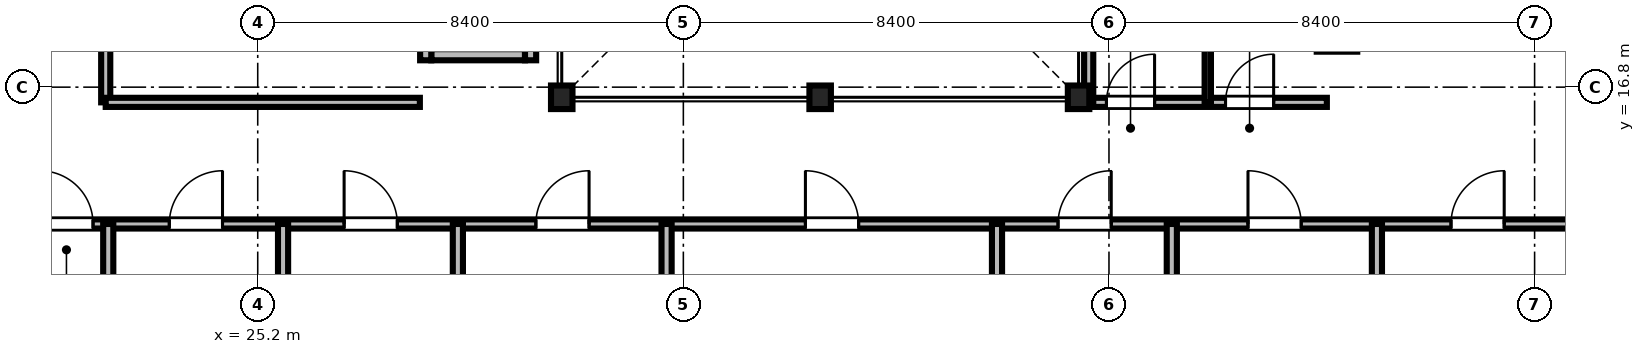
"""IFC4 building model, lengths in metres.
Left out: names, types, materials, properties, quantities, classifications, styles, units other than length and angle.
Written with IfcOpenShell. Run it as: python <this file> out.ifc"""

import sys

from ifc_helpers import new_model, si_unit, direction, frame, frame_2d, origin, origin_2d, place, context, subcontext, project, spatial, rectangle, i_section, extrude, source, transform, mapped, element, fill, save


model = new_model("IFC4")
c1 = context("Model", 3, precision=1e-05, world=origin(), true_north=direction((0.0, 1.0)))
c2 = subcontext(c1, "Body", "Model", "MODEL_VIEW")
j1 = project(units=[si_unit("LENGTHUNIT", "METRE"), si_unit("PLANEANGLEUNIT", "RADIAN")], contexts=[c1])
p1 = place(None, origin())
s1 = spatial("IfcSite", under=j1, at=p1, CompositionType="ELEMENT")
p2 = place(p1, origin())
s2 = spatial("IfcBuilding", under=s1, at=p2, CompositionType="ELEMENT")
p3 = place(p2, frame((0.0, 0.0, 122.4)))
s3 = spatial("IfcBuildingStorey", under=s2, at=p3, CompositionType="ELEMENT", Elevation=122.4)
m1 = source(origin(), c2, "Body", "SweptSolid", [
    extrude(i_section(OverallWidth=0.424, OverallDepth=0.465, WebThickness=0.035, FlangeThickness=0.056, FilletRadius=0.015, at=origin_2d()), origin(), (0.0, 0.0, 1.0), 3.46),
])
for number, where, z_axis, x_axis in (
    (1, (31.2, 16.6, 0.0), (0.0, 0.0, 1.0), (1.0, 0.0, 0.0)),
    (2, (36.3, 16.6, 0.0), (0.0, 0.0, 1.0), (1.0, 0.0, 0.0)),
    (3, (41.4, 16.6, 0.0), (0.0, 0.0, 1.0), (1.0, 0.0, 0.0)),
):
    element("IfcColumn", number, at=place(p3, frame(where, z_axis=z_axis, x_axis=x_axis)), inside=s3, PredefinedType="COLUMN", context=c2, shape_type="MappedRepresentation", body=[
        mapped(m1, transform((0.0, 0.0, 0.0), scale=1.0)),
    ])
m2 = source(origin(), c2, "Body", "SweptSolid", [
    extrude(rectangle(XDim=1.85, YDim=0.22, at=frame_2d((0.925, 0.0))), origin(), (0.0, 0.0, 1.0), 3.46),
])
p4 = place(p3, frame((28.625, 17.44, 0.0), z_axis=(0.0, 0.0, 1.0), x_axis=(1.0, 0.0, 0.0)))
e4 = element("IfcWall", 4, at=p4, inside=s3, PredefinedType="SOLIDWALL", context=c2, shape_type="MappedRepresentation", body=[
    mapped(m2, transform((0.0, 0.0, 0.0), scale=1.0)),
])
m3 = source(origin(), c2, "Body", "SweptSolid", [
    extrude(rectangle(XDim=2.54, YDim=0.22, at=frame_2d((1.27, 0.0))), origin(), (0.0, 0.0, 1.0), 3.46),
])
for number, where, z_axis, x_axis in (
    (5, (28.515, 17.33, 0.0), (0.0, 0.0, 1.0), (0.0, 1.0, 0.0)),
    (6, (30.585, 17.33, 0.0), (0.0, 0.0, 1.0), (0.0, 1.0, 0.0)),
):
    element("IfcWall", number, at=place(p3, frame(where, z_axis=z_axis, x_axis=x_axis)), inside=s3, PredefinedType="SOLIDWALL", context=c2, shape_type="MappedRepresentation", body=[
        mapped(m3, transform((0.0, 0.0, 0.0), scale=1.0)),
    ])
m4 = source(origin(), c2, "Body", "SweptSolid", [
    extrude(rectangle(XDim=46.156, YDim=0.18, at=frame_2d((23.078, 0.0))), origin(), (0.0, 0.0, 1.0), 2.702),
])
p5 = place(p3, frame((6.922, 14.1, 0.0), z_axis=(0.0, 0.0, 1.0), x_axis=(1.0, 0.0, 0.0)))
e7 = element("IfcWall", 7, at=p5, inside=s3, PredefinedType="PARTITIONING", context=c2, shape_type="MappedRepresentation", body=[
    mapped(m4, transform((0.0, 0.0, 0.0), scale=1.0)),
])
m5 = source(origin(), c2, "Body", "SweptSolid", [
    extrude(rectangle(XDim=1.05, YDim=2.2, at=frame_2d((0.525, 1.1))), frame((0.0, 0.1, 0.0), z_axis=(0.0, -1.0, 0.0), x_axis=(1.0, 0.0, 0.0)), (0.0, 0.0, 1.0), 0.2),
])
p6 = place(p5, frame((13.978, 0.0, 0.0)))
e8 = element("IfcOpeningElement", 8, at=p6, cuts=e7, PredefinedType="OPENING", context=c2, shape_type="MappedRepresentation", body=[
    mapped(m5, transform((0.0, 0.0, 0.0), scale=1.0)),
])
p7 = place(p5, frame((16.533, 0.0, 0.0)))
e9 = element("IfcOpeningElement", 9, at=p7, cuts=e7, PredefinedType="OPENING", context=c2, shape_type="MappedRepresentation", body=[
    mapped(m5, transform((0.0, 0.0, 0.0), scale=1.0)),
])
p8 = place(p5, frame((19.983, 0.0, 0.0)))
e10 = element("IfcOpeningElement", 10, at=p8, cuts=e7, PredefinedType="OPENING", context=c2, shape_type="MappedRepresentation", body=[
    mapped(m5, transform((0.0, 0.0, 0.0), scale=1.0)),
])
p9 = place(p5, frame((23.767, 0.0, 0.0)))
e11 = element("IfcOpeningElement", 11, at=p9, cuts=e7, PredefinedType="OPENING", context=c2, shape_type="MappedRepresentation", body=[
    mapped(m5, transform((0.0, 0.0, 0.0), scale=1.0)),
])
p10 = place(p5, frame((29.087, 0.0, 0.0)))
e12 = element("IfcOpeningElement", 12, at=p10, cuts=e7, PredefinedType="OPENING", context=c2, shape_type="MappedRepresentation", body=[
    mapped(m5, transform((0.0, 0.0, 0.0), scale=1.0)),
])
p11 = place(p5, frame((34.073, 0.0, 0.0)))
e13 = element("IfcOpeningElement", 13, at=p11, cuts=e7, PredefinedType="OPENING", context=c2, shape_type="MappedRepresentation", body=[
    mapped(m5, transform((0.0, 0.0, 0.0), scale=1.0)),
])
p12 = place(p5, frame((37.822, 0.0, 0.0)))
e14 = element("IfcOpeningElement", 14, at=p12, cuts=e7, PredefinedType="OPENING", context=c2, shape_type="MappedRepresentation", body=[
    mapped(m5, transform((0.0, 0.0, 0.0), scale=1.0)),
])
p13 = place(p5, frame((41.828, 0.0, 0.0)))
e15 = element("IfcOpeningElement", 15, at=p13, cuts=e7, PredefinedType="OPENING", context=c2, shape_type="MappedRepresentation", body=[
    mapped(m5, transform((0.0, 0.0, 0.0), scale=1.0)),
])
m6 = source(origin(), c2, "Body", "SweptSolid", [
    extrude(rectangle(XDim=5.4, YDim=0.18, at=frame_2d((2.7, 0.0))), origin(), (0.0, 0.0, 1.0), 2.852),
])
p14 = place(p3, frame((22.2, 16.5, 0.0), z_axis=(0.0, 0.0, 1.0), x_axis=(0.0, 1.0, 0.0)))
e16 = element("IfcWall", 16, at=p14, inside=s3, PredefinedType="PARTITIONING", context=c2, shape_type="MappedRepresentation", body=[
    mapped(m6, transform((0.0, 0.0, 0.0), scale=1.0)),
])
p15 = place(p14, frame((2.0, 0.0, 0.0)))
e17 = element("IfcOpeningElement", 17, at=p15, cuts=e16, PredefinedType="OPENING", context=c2, shape_type="MappedRepresentation", body=[
    mapped(m5, transform((0.0, 0.0, 0.0), scale=1.0)),
])
m7 = source(origin(), c2, "Body", "SweptSolid", [
    extrude(rectangle(XDim=4.7, YDim=0.18, at=frame_2d((2.35, 0.0))), origin(), (0.0, 0.0, 1.0), 2.852),
])
p16 = place(p3, frame((41.6, 16.5, 0.0), z_axis=(0.0, 0.0, 1.0), x_axis=(1.0, 0.0, 0.0)))
e18 = element("IfcWall", 18, at=p16, inside=s3, PredefinedType="PARTITIONING", context=c2, shape_type="MappedRepresentation", body=[
    mapped(m7, transform((0.0, 0.0, 0.0), scale=1.0)),
])
m8 = source(origin(), c2, "Body", "SweptSolid", [
    extrude(rectangle(XDim=0.95, YDim=2.15, at=frame_2d((0.475, 1.075))), frame((0.0, 0.1, 0.0), z_axis=(0.0, -1.0, 0.0), x_axis=(1.0, 0.0, 0.0)), (0.0, 0.0, 1.0), 0.2),
])
p17 = place(p16, frame((0.35, 0.0, 0.0)))
e19 = element("IfcOpeningElement", 19, at=p17, cuts=e18, PredefinedType="OPENING", context=c2, shape_type="MappedRepresentation", body=[
    mapped(m8, transform((0.0, 0.0, 0.0), scale=1.0)),
])
p18 = place(p16, frame((2.7, 0.0, 0.0)))
e20 = element("IfcOpeningElement", 20, at=p18, cuts=e18, PredefinedType="OPENING", context=c2, shape_type="MappedRepresentation", body=[
    mapped(m8, transform((0.0, 0.0, 0.0), scale=1.0)),
])
m9 = source(origin(), c2, "Body", "SweptSolid", [
    extrude(rectangle(XDim=11.978, YDim=0.2, at=frame_2d((5.989, 0.0))), origin(), (0.0, 0.0, 1.0), 2.702),
])
for number, where, z_axis, x_axis in (
    (21, (22.25, 2.122, 0.0), (0.0, 0.0, 1.0), (0.0, 1.0, 0.0)),
    (22, (25.7, 2.122, 0.0), (0.0, 0.0, 1.0), (0.0, 1.0, 0.0)),
):
    element("IfcWall", number, at=place(p3, frame(where, z_axis=z_axis, x_axis=x_axis)), inside=s3, PredefinedType="PARTITIONING", context=c2, shape_type="MappedRepresentation", body=[
        mapped(m9, transform((0.0, 0.0, 0.0), scale=1.0)),
    ])
m10 = source(origin(), c2, "Body", "SweptSolid", [
    extrude(rectangle(XDim=12.17, YDim=0.2, at=frame_2d((6.085, 0.0))), origin(), (0.0, 0.0, 1.0), 2.702),
])
for number, where, z_axis, x_axis in (
    (23, (29.15, 1.93, 0.0), (0.0, 0.0, 1.0), (0.0, 1.0, 0.0)),
    (24, (33.269, 1.93, 0.0), (0.0, 0.0, 1.0), (0.0, 1.0, 0.0)),
):
    element("IfcWall", number, at=place(p3, frame(where, z_axis=z_axis, x_axis=x_axis)), inside=s3, PredefinedType="PARTITIONING", context=c2, shape_type="MappedRepresentation", body=[
        mapped(m10, transform((0.0, 0.0, 0.0), scale=1.0)),
    ])
for number, where, z_axis, x_axis in (
    (25, (39.79, 2.122, 0.0), (0.0, 0.0, 1.0), (0.0, 1.0, 0.0)),
    (26, (43.24, 2.122, 0.0), (0.0, 0.0, 1.0), (0.0, 1.0, 0.0)),
    (27, (47.288, 2.122, 0.0), (0.0, 0.0, 1.0), (0.0, 1.0, 0.0)),
):
    element("IfcWall", number, at=place(p3, frame(where, z_axis=z_axis, x_axis=x_axis)), inside=s3, PredefinedType="PARTITIONING", context=c2, shape_type="MappedRepresentation", body=[
        mapped(m9, transform((0.0, 0.0, 0.0), scale=1.0)),
    ])
m11 = source(origin(), c2, "Body", "SweptSolid", [
    extrude(rectangle(XDim=7.15, YDim=0.18, at=frame_2d((3.575, 0.0))), origin(), (0.0, 0.0, 1.0), 2.852),
])
p19 = place(p3, frame((41.6, 16.5, 0.0), z_axis=(0.0, 0.0, 1.0), x_axis=(0.0, 1.0, 0.0)))
e28 = element("IfcWall", 28, at=p19, inside=s3, PredefinedType="PARTITIONING", context=c2, shape_type="MappedRepresentation", body=[
    mapped(m11, transform((0.0, 0.0, 0.0), scale=1.0)),
])
m12 = source(origin(), c2, "Body", "SweptSolid", [
    extrude(rectangle(XDim=7.15, YDim=0.125, at=frame_2d((3.575, 0.0))), origin(), (0.0, 0.0, 1.0), 2.852),
])
p20 = place(p3, frame((43.95, 16.5, 0.0), z_axis=(0.0, 0.0, 1.0), x_axis=(0.0, 1.0, 0.0)))
e29 = element("IfcWall", 29, at=p20, inside=s3, PredefinedType="PARTITIONING", context=c2, shape_type="MappedRepresentation", body=[
    mapped(m12, transform((0.0, 0.0, 0.0), scale=1.0)),
])
m13 = source(origin(), c2, "Body", "SweptSolid", [
    extrude(rectangle(XDim=6.2, YDim=0.18, at=frame_2d((3.1, 0.0))), origin(), (0.0, 0.0, 1.0), 3.46),
])
p21 = place(p3, frame((22.2, 16.5, 0.0), z_axis=(0.0, 0.0, 1.0), x_axis=(1.0, 0.0, 0.0)))
e30 = element("IfcWall", 30, at=p21, inside=s3, PredefinedType="PARTITIONING", context=c2, shape_type="MappedRepresentation", body=[
    mapped(m13, transform((0.0, 0.0, 0.0), scale=1.0)),
])
m14 = source(origin(), c2, "Body", "SweptSolid", [
    extrude(rectangle(XDim=1.05, YDim=2.2, at=frame_2d((0.525, 1.1))), frame((0.0, 0.025, 0.0), z_axis=(0.0, -1.0, 0.0), x_axis=(1.0, 0.0, 0.0)), (0.0, 0.0, 1.0), 0.05),
])
p22 = place(p6, origin())
e31 = element("IfcDoor", 31, at=p22, inside=s3, OperationType="SINGLE_SWING_LEFT", PredefinedType="DOOR", context=c2, shape_type="MappedRepresentation", body=[
    mapped(m14, transform((0.0, 0.0, 0.0), scale=1.0)),
])
fill(e8, e31)
p23 = place(p7, origin())
e32 = element("IfcDoor", 32, at=p23, inside=s3, OperationType="SINGLE_SWING_RIGHT", PredefinedType="DOOR", context=c2, shape_type="MappedRepresentation", body=[
    mapped(m14, transform((0.0, 0.0, 0.0), scale=1.0)),
])
fill(e9, e32)
p24 = place(p8, origin())
e33 = element("IfcDoor", 33, at=p24, inside=s3, OperationType="SINGLE_SWING_LEFT", PredefinedType="DOOR", context=c2, shape_type="MappedRepresentation", body=[
    mapped(m14, transform((0.0, 0.0, 0.0), scale=1.0)),
])
fill(e10, e33)
p25 = place(p9, origin())
e34 = element("IfcDoor", 34, at=p25, inside=s3, OperationType="SINGLE_SWING_RIGHT", PredefinedType="DOOR", context=c2, shape_type="MappedRepresentation", body=[
    mapped(m14, transform((0.0, 0.0, 0.0), scale=1.0)),
])
fill(e11, e34)
p26 = place(p10, origin())
e35 = element("IfcDoor", 35, at=p26, inside=s3, OperationType="SINGLE_SWING_LEFT", PredefinedType="DOOR", context=c2, shape_type="MappedRepresentation", body=[
    mapped(m14, transform((0.0, 0.0, 0.0), scale=1.0)),
])
fill(e12, e35)
p27 = place(p11, origin())
e36 = element("IfcDoor", 36, at=p27, inside=s3, OperationType="SINGLE_SWING_RIGHT", PredefinedType="DOOR", context=c2, shape_type="MappedRepresentation", body=[
    mapped(m14, transform((0.0, 0.0, 0.0), scale=1.0)),
])
fill(e13, e36)
p28 = place(p12, origin())
e37 = element("IfcDoor", 37, at=p28, inside=s3, OperationType="SINGLE_SWING_LEFT", PredefinedType="DOOR", context=c2, shape_type="MappedRepresentation", body=[
    mapped(m14, transform((0.0, 0.0, 0.0), scale=1.0)),
])
fill(e14, e37)
p29 = place(p13, origin())
e38 = element("IfcDoor", 38, at=p29, inside=s3, OperationType="SINGLE_SWING_RIGHT", PredefinedType="DOOR", context=c2, shape_type="MappedRepresentation", body=[
    mapped(m14, transform((0.0, 0.0, 0.0), scale=1.0)),
])
fill(e15, e38)
m15 = source(origin(), c2, "Body", "SweptSolid", [
    extrude(rectangle(XDim=0.95, YDim=2.15, at=frame_2d((0.475, 1.075))), frame((0.0, 0.025, 0.0), z_axis=(0.0, -1.0, 0.0), x_axis=(1.0, 0.0, 0.0)), (0.0, 0.0, 1.0), 0.05),
])
p30 = place(p17, origin())
e39 = element("IfcDoor", 39, at=p30, inside=s3, OperationType="SINGLE_SWING_RIGHT", PredefinedType="DOOR", context=c2, shape_type="MappedRepresentation", body=[
    mapped(m15, transform((0.0, 0.0, 0.0), scale=1.0)),
])
fill(e19, e39)
p31 = place(p18, origin())
e40 = element("IfcDoor", 40, at=p31, inside=s3, OperationType="SINGLE_SWING_RIGHT", PredefinedType="DOOR", context=c2, shape_type="MappedRepresentation", body=[
    mapped(m15, transform((0.0, 0.0, 0.0), scale=1.0)),
])
fill(e20, e40)
save(model, sys.argv[1])
